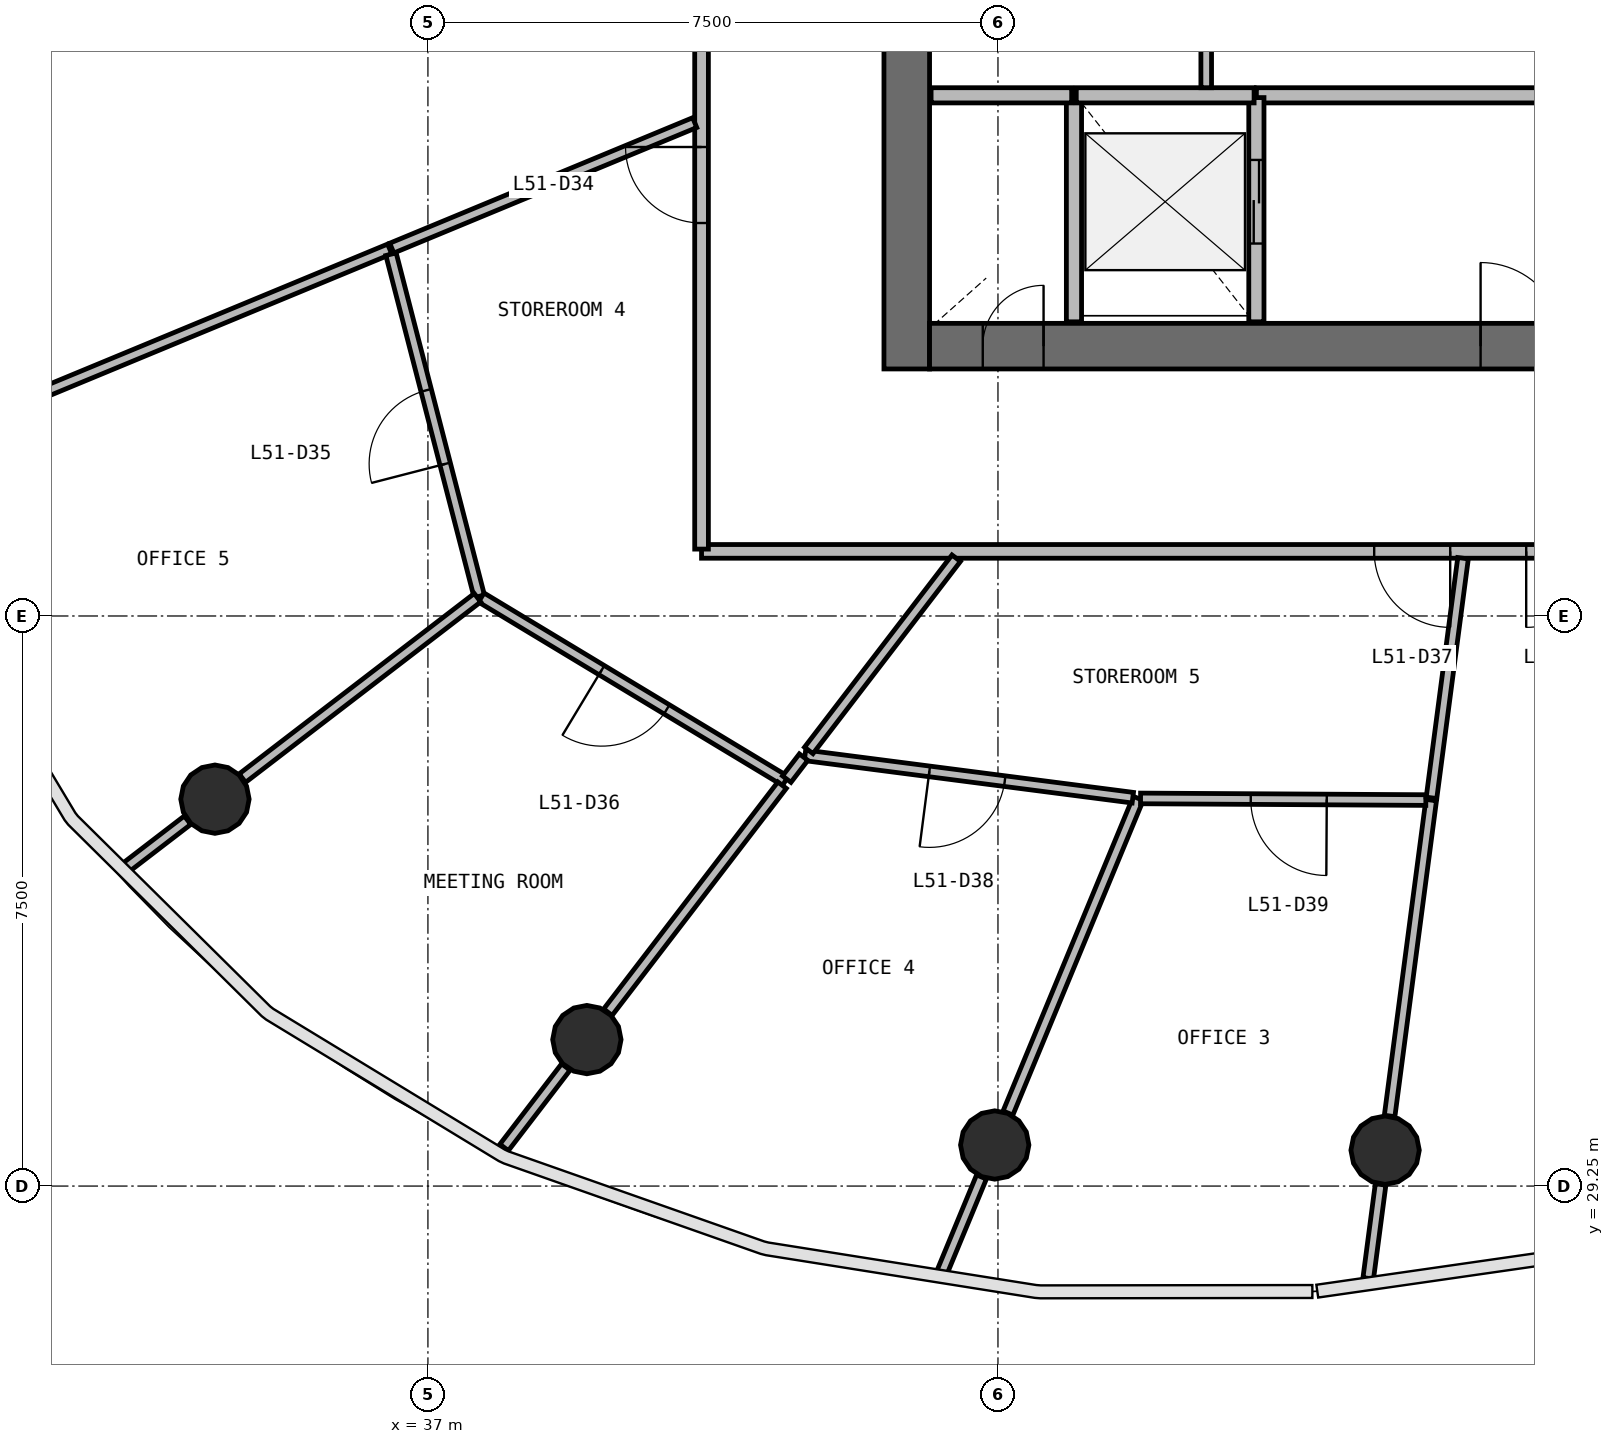
"""IFC4 building model, lengths in metres.
Left out: names, types, materials, properties, quantities, classifications, styles, units other than length and angle.
Written with IfcOpenShell. Run it as: python <this file> out.ifc"""

import sys

from ifc_helpers import new_model, si_unit, direction, frame, frame_2d, origin, origin_2d, place, context, subcontext, project, spatial, rectangle, circle, extrude, source, transform, mapped, element, fill, save


model = new_model("IFC4")
c1 = context("Model", 3, precision=1e-05, world=origin(), true_north=direction((0.0, 1.0)))
c2 = subcontext(c1, "Body", "Model", "MODEL_VIEW")
j1 = project(units=[si_unit("LENGTHUNIT", "METRE"), si_unit("PLANEANGLEUNIT", "RADIAN")], contexts=[c1])
p1 = place(None, origin())
s1 = spatial("IfcSite", under=j1, at=p1, CompositionType="ELEMENT")
p2 = place(p1, origin())
s2 = spatial("IfcBuilding", under=s1, at=p2, CompositionType="ELEMENT")
p3 = place(p2, frame((0.0, 0.0, 211.1)))
s3 = spatial("IfcBuildingStorey", under=s2, at=p3, CompositionType="ELEMENT", Elevation=211.1)
p4 = place(p3, frame((43.3, 56.0, 0.0), z_axis=(0.0, 0.0, 1.0), x_axis=(0.0, -1.0, 0.0)))
e1 = element("IfcWall", 1, at=p4, inside=s3, PredefinedType="SHEAR", context=c2, shape_type="SweptSolid", body=[
    extrude(rectangle(XDim=16.0, YDim=0.6, at=frame_2d((8.0, 0.0))), origin(), (0.0, 0.0, 1.0), 3.9),
])
p5 = place(p4, frame((7.1, 0.0, 0.0)))
e2 = element("IfcOpeningElement", 2, at=p5, cuts=e1, PredefinedType="OPENING", context=c2, shape_type="SweptSolid", body=[
    extrude(rectangle(XDim=1.8, YDim=2.1, at=frame_2d((0.9, 1.05))), frame((0.0, 0.31, 0.0), z_axis=(0.0, -1.0, 0.0), x_axis=(1.0, 0.0, 0.0)), (0.0, 0.0, 1.0), 0.62),
])
p6 = place(p3, frame((43.6, 40.3, 0.0), z_axis=(0.0, 0.0, 1.0), x_axis=(1.0, 0.0, 0.0)))
e3 = element("IfcWall", 3, at=p6, inside=s3, PredefinedType="SHEAR", context=c2, shape_type="SweptSolid", body=[
    extrude(rectangle(XDim=16.8, YDim=0.6, at=frame_2d((8.4, 0.0))), origin(), (0.0, 0.0, 1.0), 3.9),
])
p7 = place(p6, frame((10.3, 0.0, 0.0)))
e4 = element("IfcOpeningElement", 4, at=p7, cuts=e3, PredefinedType="OPENING", context=c2, shape_type="SweptSolid", body=[
    extrude(rectangle(XDim=1.2, YDim=2.1, at=frame_2d((0.6, 1.05))), frame((0.0, 0.31, 0.0), z_axis=(0.0, -1.0, 0.0), x_axis=(1.0, 0.0, 0.0)), (0.0, 0.0, 1.0), 0.62),
])
p8 = place(p6, frame((7.25, 0.0, 0.0)))
e5 = element("IfcOpeningElement", 5, at=p8, cuts=e3, PredefinedType="OPENING", context=c2, shape_type="SweptSolid", body=[
    extrude(rectangle(XDim=1.1, YDim=2.1, at=frame_2d((0.55, 1.05))), frame((0.0, 0.31, 0.0), z_axis=(0.0, -1.0, 0.0), x_axis=(1.0, 0.0, 0.0)), (0.0, 0.0, 1.0), 0.62),
])
p9 = place(p6, frame((0.7, 0.0, 0.0)))
e6 = element("IfcOpeningElement", 6, at=p9, cuts=e3, PredefinedType="OPENING", context=c2, shape_type="SweptSolid", body=[
    extrude(rectangle(XDim=0.8, YDim=2.1, at=frame_2d((0.4, 1.05))), frame((0.0, 0.31, 0.0), z_axis=(0.0, -1.0, 0.0), x_axis=(1.0, 0.0, 0.0)), (0.0, 0.0, 1.0), 0.62),
])
m1 = source(origin(), c2, "Body", "SweptSolid", [
    extrude(circle(Radius=0.45, at=origin_2d()), origin(), (0.0, 0.0, 1.0), 3.9),
])
for number, where, z_axis, x_axis in (
    (7, (34.198, 34.34, 0.0), (0.0, 0.0, 1.0), (1.0, 0.0, 0.0)),
    (8, (39.091, 31.177, 0.0), (0.0, 0.0, 1.0), (1.0, 0.0, 0.0)),
    (9, (44.457, 29.79, 0.0), (0.0, 0.0, 1.0), (1.0, 0.0, 0.0)),
    (10, (49.594, 29.722, 0.0), (0.0, 0.0, 1.0), (1.0, 0.0, 0.0)),
):
    element("IfcColumn", number, at=place(p3, frame(where, z_axis=z_axis, x_axis=x_axis)), inside=s3, PredefinedType="COLUMN", context=c2, shape_type="MappedRepresentation", body=[
        mapped(m1, transform((0.0, 0.0, 0.0), scale=1.0)),
    ])
p10 = place(p3, frame((52.7, 43.6, 0.0), z_axis=(0.0, 0.0, 1.0), x_axis=(-1.0, 0.0, 0.0)))
e11 = element("IfcWall", 11, at=p10, inside=s3, PredefinedType="SOLIDWALL", context=c2, shape_type="SweptSolid", body=[
    extrude(rectangle(XDim=4.8, YDim=0.2, at=frame_2d((2.4, 0.0))), origin(), (0.0, 0.0, 1.0), 3.58),
])
p11 = place(p3, frame((45.5, 43.6, 0.0), z_axis=(0.0, 0.0, 1.0), x_axis=(0.0, -1.0, 0.0)))
e12 = element("IfcWall", 12, at=p11, inside=s3, PredefinedType="SOLIDWALL", context=c2, shape_type="SweptSolid", body=[
    extrude(rectangle(XDim=2.98, YDim=0.2, at=frame_2d((1.49, 0.0))), origin(), (0.0, 0.0, 1.0), 3.58),
])
p12 = place(p3, frame((47.9, 40.62, 0.0), z_axis=(0.0, 0.0, 1.0), x_axis=(0.0, 1.0, 0.0)))
e13 = element("IfcWall", 13, at=p12, inside=s3, PredefinedType="SOLIDWALL", context=c2, shape_type="SweptSolid", body=[
    extrude(rectangle(XDim=2.95, YDim=0.2, at=frame_2d((1.475, 0.0))), origin(), (0.0, 0.0, 1.0), 3.58),
])
p13 = place(p12, frame((1.03, 0.0, 0.0)))
e14 = element("IfcOpeningElement", 14, at=p13, cuts=e13, PredefinedType="OPENING", context=c2, shape_type="SweptSolid", body=[
    extrude(rectangle(XDim=1.1, YDim=2.1, at=frame_2d((0.55, 1.05))), frame((0.0, 0.11, 0.0), z_axis=(0.0, -1.0, 0.0), x_axis=(1.0, 0.0, 0.0)), (0.0, 0.0, 1.0), 0.22),
])
p14 = place(p3, frame((47.87, 43.6, 0.0), z_axis=(0.0, 0.0, 1.0), x_axis=(-1.0, 0.0, 0.0)))
e15 = element("IfcWall", 15, at=p14, inside=s3, PredefinedType="SOLIDWALL", context=c2, shape_type="SweptSolid", body=[
    extrude(rectangle(XDim=2.34, YDim=0.2, at=frame_2d((1.17, 0.0))), origin(), (0.0, 0.0, 1.0), 3.58),
])
p15 = place(p3, frame((45.47, 43.6, 0.0), z_axis=(0.0, 0.0, 1.0), x_axis=(-1.0, 0.0, 0.0)))
e16 = element("IfcWall", 16, at=p15, inside=s3, PredefinedType="SOLIDWALL", context=c2, shape_type="SweptSolid", body=[
    extrude(rectangle(XDim=1.85, YDim=0.2, at=frame_2d((0.925, 0.0))), origin(), (0.0, 0.0, 1.0), 3.58),
])
p16 = place(p3, frame((63.4, 37.6, 0.0), z_axis=(0.0, 0.0, 1.0), x_axis=(-1.0, 0.0, 0.0)))
e17 = element("IfcWall", 17, at=p16, inside=s3, PredefinedType="PARTITIONING", context=c2, shape_type="SweptSolid", body=[
    extrude(rectangle(XDim=22.8, YDim=0.18, at=frame_2d((11.4, 0.0))), origin(), (0.0, 0.0, 1.0), 2.88),
])
p17 = place(p16, frame((12.95, 0.0, 0.0)))
e18 = element("IfcOpeningElement", 18, at=p17, cuts=e17, PredefinedType="OPENING", context=c2, shape_type="SweptSolid", body=[
    extrude(rectangle(XDim=1.0, YDim=2.1, at=frame_2d((0.5, 1.05))), frame((0.0, 0.1, 0.0), z_axis=(0.0, -1.0, 0.0), x_axis=(1.0, 0.0, 0.0)), (0.0, 0.0, 1.0), 0.2),
])
p18 = place(p16, frame((10.95, 0.0, 0.0)))
e19 = element("IfcOpeningElement", 19, at=p18, cuts=e17, PredefinedType="OPENING", context=c2, shape_type="SweptSolid", body=[
    extrude(rectangle(XDim=1.0, YDim=2.1, at=frame_2d((0.5, 1.05))), frame((0.0, 0.1, 0.0), z_axis=(0.0, -1.0, 0.0), x_axis=(1.0, 0.0, 0.0)), (0.0, 0.0, 1.0), 0.2),
])
p19 = place(p16, frame((5.75, 0.0, 0.0)))
e20 = element("IfcOpeningElement", 20, at=p19, cuts=e17, PredefinedType="OPENING", context=c2, shape_type="SweptSolid", body=[
    extrude(rectangle(XDim=1.0, YDim=2.1, at=frame_2d((0.5, 1.05))), frame((0.0, 0.1, 0.0), z_axis=(0.0, -1.0, 0.0), x_axis=(1.0, 0.0, 0.0)), (0.0, 0.0, 1.0), 0.2),
])
p20 = place(p3, frame((40.6, 37.63, 0.0), z_axis=(0.0, 0.0, 1.0), x_axis=(0.0, 1.0, 0.0)))
e21 = element("IfcWall", 21, at=p20, inside=s3, PredefinedType="PARTITIONING", context=c2, shape_type="SweptSolid", body=[
    extrude(rectangle(XDim=20.74, YDim=0.18, at=frame_2d((10.37, 0.0))), origin(), (0.0, 0.0, 1.0), 2.88),
])
p21 = place(p20, frame((9.89, 0.0, 0.0)))
e22 = element("IfcOpeningElement", 22, at=p21, cuts=e21, PredefinedType="OPENING", context=c2, shape_type="SweptSolid", body=[
    extrude(rectangle(XDim=1.0, YDim=2.1, at=frame_2d((0.5, 1.05))), frame((0.0, 0.1, 0.0), z_axis=(0.0, -1.0, 0.0), x_axis=(1.0, 0.0, 0.0)), (0.0, 0.0, 1.0), 0.2),
])
p22 = place(p20, frame((4.29, 0.0, 0.0)))
e23 = element("IfcOpeningElement", 23, at=p22, cuts=e21, PredefinedType="OPENING", context=c2, shape_type="SweptSolid", body=[
    extrude(rectangle(XDim=1.0, YDim=2.1, at=frame_2d((0.5, 1.05))), frame((0.0, 0.1, 0.0), z_axis=(0.0, -1.0, 0.0), x_axis=(1.0, 0.0, 0.0)), (0.0, 0.0, 1.0), 0.2),
])
p23 = place(p3, frame((36.497, 41.578, 0.0), z_axis=(0.0, 0.0, 1.0), x_axis=(-0.923872241602, -0.382701033703, 0.0)))
e24 = element("IfcWall", 24, at=p23, inside=s3, PredefinedType="PARTITIONING", context=c2, shape_type="SweptSolid", body=[
    extrude(rectangle(XDim=5.227, YDim=0.14, at=frame_2d((2.614, 0.0))), origin(), (0.0, 0.0, 1.0), 2.88),
])
p24 = place(p3, frame((37.676, 37.009, 0.0), z_axis=(0.0, 0.0, 1.0), x_axis=(-0.249819251726, 0.968292487561, 0.0)))
e25 = element("IfcWall", 25, at=p24, inside=s3, PredefinedType="PARTITIONING", context=c2, shape_type="SweptSolid", body=[
    extrude(rectangle(XDim=4.649, YDim=0.14, at=frame_2d((2.324, 0.0))), origin(), (0.0, 0.0, 1.0), 2.88),
])
p25 = place(p24, frame((1.799, 0.0, 0.0)))
e26 = element("IfcOpeningElement", 26, at=p25, cuts=e25, PredefinedType="OPENING", context=c2, shape_type="SweptSolid", body=[
    extrude(rectangle(XDim=1.0, YDim=2.1, at=frame_2d((0.5, 1.05))), frame((0.0, 0.08, 0.0), z_axis=(0.0, -1.0, 0.0), x_axis=(1.0, 0.0, 0.0)), (0.0, 0.0, 1.0), 0.16),
])
p26 = place(p3, frame((41.702, 34.58, 0.0), z_axis=(0.0, 0.0, 1.0), x_axis=(-0.856310382511, 0.516461546298, 0.0)))
e27 = element("IfcWall", 27, at=p26, inside=s3, PredefinedType="PARTITIONING", context=c2, shape_type="SweptSolid", body=[
    extrude(rectangle(XDim=4.672, YDim=0.14, at=frame_2d((2.336, 0.0))), origin(), (0.0, 0.0, 1.0), 2.88),
])
p27 = place(p26, frame((1.823, 0.0, 0.0)))
e28 = element("IfcOpeningElement", 28, at=p27, cuts=e27, PredefinedType="OPENING", context=c2, shape_type="SweptSolid", body=[
    extrude(rectangle(XDim=1.0, YDim=2.1, at=frame_2d((0.5, 1.05))), frame((0.0, 0.08, 0.0), z_axis=(0.0, -1.0, 0.0), x_axis=(1.0, 0.0, 0.0)), (0.0, 0.0, 1.0), 0.16),
])
p28 = place(p3, frame((46.346, 34.35, 0.0), z_axis=(0.0, 0.0, 1.0), x_axis=(-0.382683853281, -0.923879358162, 0.0)))
e29 = element("IfcWall", 29, at=p28, inside=s3, PredefinedType="PARTITIONING", context=c2, shape_type="SweptSolid", body=[
    extrude(rectangle(XDim=4.48, YDim=0.14, at=frame_2d((2.24, 0.0))), origin(), (0.0, 0.0, 1.0), 2.88),
])
p29 = place(p3, frame((40.51, 43.241, 0.0), z_axis=(0.0, 0.0, 1.0), x_axis=(-0.923880260939, -0.382681673781, 0.0)))
e30 = element("IfcWall", 30, at=p29, inside=s3, PredefinedType="PARTITIONING", context=c2, shape_type="SweptSolid", body=[
    extrude(rectangle(XDim=4.314, YDim=0.14, at=frame_2d((2.157, 0.0))), origin(), (0.0, 0.0, 1.0), 2.88),
])
p30 = place(p3, frame((46.274, 34.359, 0.0), z_axis=(0.0, 0.0, 1.0), x_axis=(-0.991745657541, 0.128220711073, 0.0)))
e31 = element("IfcWall", 31, at=p30, inside=s3, PredefinedType="PARTITIONING", context=c2, shape_type="SweptSolid", body=[
    extrude(rectangle(XDim=4.349, YDim=0.14, at=frame_2d((2.174, 0.0))), origin(), (0.0, 0.0, 1.0), 2.88),
])
p31 = place(p30, frame((1.699, 0.0, 0.0)))
e32 = element("IfcOpeningElement", 32, at=p31, cuts=e31, PredefinedType="OPENING", context=c2, shape_type="SweptSolid", body=[
    extrude(rectangle(XDim=1.0, YDim=2.1, at=frame_2d((0.5, 1.05))), frame((0.0, 0.08, 0.0), z_axis=(0.0, -1.0, 0.0), x_axis=(1.0, 0.0, 0.0)), (0.0, 0.0, 1.0), 0.16),
])
p32 = place(p3, frame((50.2, 34.328, 0.0), z_axis=(0.0, 0.0, 1.0), x_axis=(-0.130534370564, -0.99144378464, 0.0)))
e33 = element("IfcWall", 33, at=p32, inside=s3, PredefinedType="PARTITIONING", context=c2, shape_type="SweptSolid", body=[
    extrude(rectangle(XDim=4.191, YDim=0.14, at=frame_2d((2.096, 0.0))), origin(), (0.0, 0.0, 1.0), 2.88),
])
p33 = place(p3, frame((37.652, 36.99, 0.0), z_axis=(0.0, 0.0, 1.0), x_axis=(-0.793347300472, -0.608769300173, 0.0)))
e34 = element("IfcWall", 34, at=p33, inside=s3, PredefinedType="PARTITIONING", context=c2, shape_type="SweptSolid", body=[
    extrude(rectangle(XDim=3.899, YDim=0.14, at=frame_2d((1.95, 0.0))), origin(), (0.0, 0.0, 1.0), 2.88),
])
p34 = place(p3, frame((50.129, 34.328, 0.0), z_axis=(0.0, 0.0, 1.0), x_axis=(-0.999983244193, 0.005788897407, 0.0)))
e35 = element("IfcWall", 35, at=p34, inside=s3, PredefinedType="PARTITIONING", context=c2, shape_type="SweptSolid", body=[
    extrude(rectangle(XDim=3.753, YDim=0.14, at=frame_2d((1.877, 0.0))), origin(), (0.0, 0.0, 1.0), 2.88),
])
p35 = place(p34, frame((1.303, 0.0, 0.0)))
e36 = element("IfcOpeningElement", 36, at=p35, cuts=e35, PredefinedType="OPENING", context=c2, shape_type="SweptSolid", body=[
    extrude(rectangle(XDim=1.0, YDim=2.1, at=frame_2d((0.5, 1.05))), frame((0.0, 0.08, 0.0), z_axis=(0.0, -1.0, 0.0), x_axis=(1.0, 0.0, 0.0)), (0.0, 0.0, 1.0), 0.16),
])
p36 = place(p3, frame((41.66, 34.524, 0.0), z_axis=(0.0, 0.0, 1.0), x_axis=(-0.60877322383, -0.793344289667, 0.0)))
e37 = element("IfcWall", 37, at=p36, inside=s3, PredefinedType="PARTITIONING", context=c2, shape_type="SweptSolid", body=[
    extrude(rectangle(XDim=3.765, YDim=0.14, at=frame_2d((1.882, 0.0))), origin(), (0.0, 0.0, 1.0), 2.88),
])
p37 = place(p3, frame((41.943, 34.893, 0.0), z_axis=(0.0, 0.0, 1.0), x_axis=(-0.608740457709, -0.793369431695, 0.0)))
e38 = element("IfcWall", 38, at=p37, inside=s3, PredefinedType="PARTITIONING", context=c2, shape_type="SweptSolid", body=[
    extrude(rectangle(XDim=0.365, YDim=0.14, at=frame_2d((0.183, 0.0))), origin(), (0.0, 0.0, 1.0), 2.88),
])
p38 = place(p3, frame((43.951, 37.51, 0.0), z_axis=(0.0, 0.0, 1.0), x_axis=(-0.60871452172, -0.793389331317, 0.0)))
e39 = element("IfcWall", 39, at=p38, inside=s3, PredefinedType="PARTITIONING", context=c2, shape_type="SweptSolid", body=[
    extrude(rectangle(XDim=3.187, YDim=0.14, at=frame_2d((1.594, 0.0))), origin(), (0.0, 0.0, 1.0), 2.88),
])
p39 = place(p3, frame((50.619, 37.51, 0.0), z_axis=(0.0, 0.0, 1.0), x_axis=(-0.130524026108, -0.991445146546, 0.0)))
e40 = element("IfcWall", 40, at=p39, inside=s3, PredefinedType="PARTITIONING", context=c2, shape_type="SweptSolid", body=[
    extrude(rectangle(XDim=3.18, YDim=0.14, at=frame_2d((1.59, 0.0))), origin(), (0.0, 0.0, 1.0), 2.88),
])
p40 = place(p3, frame((47.24, 43.7, 0.0), z_axis=(0.0, 0.0, 1.0), x_axis=(0.0, 1.0, 0.0)))
e41 = element("IfcWall", 41, at=p40, inside=s3, PredefinedType="PARTITIONING", context=c2, shape_type="SweptSolid", body=[
    extrude(rectangle(XDim=2.29, YDim=0.14, at=frame_2d((1.145, 0.0))), origin(), (0.0, 0.0, 1.0), 2.88),
])
p41 = place(p3, frame((44.283, 29.37, 0.0), z_axis=(0.0, 0.0, 1.0), x_axis=(-0.382733825207, -0.923858657502, 0.0)))
e42 = element("IfcWall", 42, at=p41, inside=s3, PredefinedType="PARTITIONING", context=c2, shape_type="SweptSolid", body=[
    extrude(rectangle(XDim=1.373, YDim=0.14, at=frame_2d((0.687, 0.0))), origin(), (0.0, 0.0, 1.0), 2.88),
])
p42 = place(p3, frame((38.814, 30.816, 0.0), z_axis=(0.0, 0.0, 1.0), x_axis=(-0.608692849826, -0.79340595824, 0.0)))
e43 = element("IfcWall", 43, at=p42, inside=s3, PredefinedType="PARTITIONING", context=c2, shape_type="SweptSolid", body=[
    extrude(rectangle(XDim=1.334, YDim=0.14, at=frame_2d((0.667, 0.0))), origin(), (0.0, 0.0, 1.0), 2.88),
])
p43 = place(p3, frame((49.534, 29.271, 0.0), z_axis=(0.0, 0.0, 1.0), x_axis=(-0.130520415919, -0.991445621821, 0.0)))
e44 = element("IfcWall", 44, at=p43, inside=s3, PredefinedType="PARTITIONING", context=c2, shape_type="SweptSolid", body=[
    extrude(rectangle(XDim=1.246, YDim=0.14, at=frame_2d((0.623, 0.0))), origin(), (0.0, 0.0, 1.0), 2.88),
])
p44 = place(p3, frame((33.837, 34.063, 0.0), z_axis=(0.0, 0.0, 1.0), x_axis=(-0.793403619358, -0.608695898449, 0.0)))
e45 = element("IfcWall", 45, at=p44, inside=s3, PredefinedType="PARTITIONING", context=c2, shape_type="SweptSolid", body=[
    extrude(rectangle(XDim=1.047, YDim=0.14, at=frame_2d((0.523, 0.0))), origin(), (0.0, 0.0, 1.0), 2.88),
])
m2 = source(origin(), c2, "Body", "SweptSolid", [
    extrude(rectangle(XDim=1.1, YDim=2.1, at=frame_2d((0.55, 1.05))), frame((0.0, 0.025, 0.0), z_axis=(0.0, -1.0, 0.0), x_axis=(1.0, 0.0, 0.0)), (0.0, 0.0, 1.0), 0.05),
])
p45 = place(p13, origin())
e46 = element("IfcDoor", 46, at=p45, inside=s3, OperationType="DOUBLE_DOOR_SLIDING", PredefinedType="USERDEFINED", context=c2, shape_type="MappedRepresentation", body=[
    mapped(m2, transform((0.0, 0.0, 0.0), scale=1.0)),
])
fill(e14, e46)
m3 = source(origin(), c2, "Body", "SweptSolid", [
    extrude(rectangle(XDim=1.1, YDim=2.1, at=frame_2d((0.55, 1.05))), frame((0.0, 0.025, 0.0), z_axis=(0.0, -1.0, 0.0), x_axis=(1.0, 0.0, 0.0)), (0.0, 0.0, 1.0), 0.05),
])
p46 = place(p8, origin())
e47 = element("IfcDoor", 47, at=p46, inside=s3, OperationType="SINGLE_SWING_LEFT", PredefinedType="DOOR", context=c2, shape_type="MappedRepresentation", body=[
    mapped(m3, transform((0.0, 0.0, 0.0), scale=1.0)),
])
fill(e5, e47)
m4 = source(origin(), c2, "Body", "SweptSolid", [
    extrude(rectangle(XDim=0.8, YDim=2.1, at=frame_2d((0.4, 1.05))), frame((0.0, 0.025, 0.0), z_axis=(0.0, -1.0, 0.0), x_axis=(1.0, 0.0, 0.0)), (0.0, 0.0, 1.0), 0.05),
])
p47 = place(p9, origin())
e48 = element("IfcDoor", 48, at=p47, inside=s3, OperationType="SINGLE_SWING_RIGHT", PredefinedType="DOOR", context=c2, shape_type="MappedRepresentation", body=[
    mapped(m4, transform((0.0, 0.0, 0.0), scale=1.0)),
])
fill(e6, e48)
m5 = source(origin(), c2, "Body", "SweptSolid", [
    extrude(rectangle(XDim=1.0, YDim=2.1, at=frame_2d((0.5, 1.05))), frame((0.0, 0.025, 0.0), z_axis=(0.0, -1.0, 0.0), x_axis=(1.0, 0.0, 0.0)), (0.0, 0.0, 1.0), 0.05),
])
p48 = place(p22, origin())
e49 = element("IfcDoor", 49, at=p48, inside=s3, OperationType="SINGLE_SWING_RIGHT", PredefinedType="DOOR", context=c2, shape_type="MappedRepresentation", body=[
    mapped(m5, transform((0.0, 0.0, 0.0), scale=1.0)),
])
fill(e23, e49)
p49 = place(p25, origin())
e50 = element("IfcDoor", 50, at=p49, inside=s3, OperationType="SINGLE_SWING_LEFT", PredefinedType="DOOR", context=c2, shape_type="MappedRepresentation", body=[
    mapped(m5, transform((0.0, 0.0, 0.0), scale=1.0)),
])
fill(e26, e50)
p50 = place(p27, origin())
e51 = element("IfcDoor", 51, at=p50, inside=s3, OperationType="SINGLE_SWING_RIGHT", PredefinedType="DOOR", context=c2, shape_type="MappedRepresentation", body=[
    mapped(m5, transform((0.0, 0.0, 0.0), scale=1.0)),
])
fill(e28, e51)
p51 = place(p17, origin())
e52 = element("IfcDoor", 52, at=p51, inside=s3, OperationType="SINGLE_SWING_LEFT", PredefinedType="DOOR", context=c2, shape_type="MappedRepresentation", body=[
    mapped(m5, transform((0.0, 0.0, 0.0), scale=1.0)),
])
fill(e18, e52)
p52 = place(p31, origin())
e53 = element("IfcDoor", 53, at=p52, inside=s3, OperationType="SINGLE_SWING_RIGHT", PredefinedType="DOOR", context=c2, shape_type="MappedRepresentation", body=[
    mapped(m5, transform((0.0, 0.0, 0.0), scale=1.0)),
])
fill(e32, e53)
p53 = place(p35, origin())
e54 = element("IfcDoor", 54, at=p53, inside=s3, OperationType="SINGLE_SWING_LEFT", PredefinedType="DOOR", context=c2, shape_type="MappedRepresentation", body=[
    mapped(m5, transform((0.0, 0.0, 0.0), scale=1.0)),
])
fill(e36, e54)
p54 = place(p18, origin())
e55 = element("IfcDoor", 55, at=p54, inside=s3, OperationType="SINGLE_SWING_RIGHT", PredefinedType="DOOR", context=c2, shape_type="MappedRepresentation", body=[
    mapped(m5, transform((0.0, 0.0, 0.0), scale=1.0)),
])
fill(e19, e55)
save(model, sys.argv[1])
